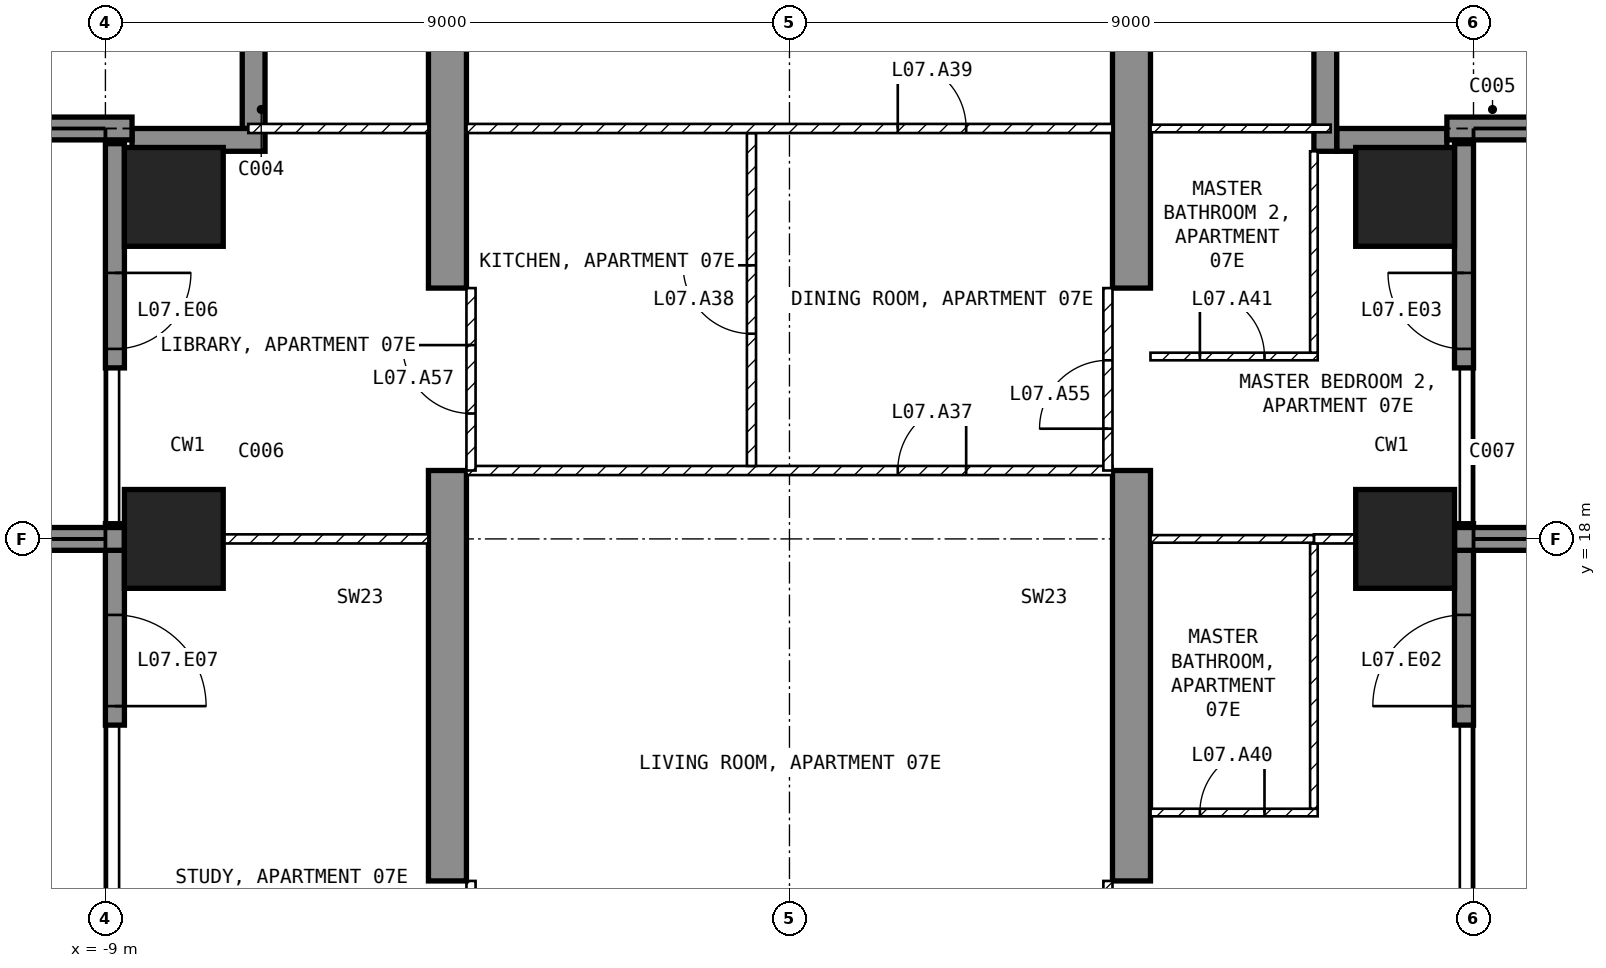
"""IFC4 building model, lengths in metres.
Left out: names, types, materials, properties, quantities, classifications, styles, units other than length and angle.
Written with IfcOpenShell. Run it as: python <this file> out.ifc"""

import sys

from ifc_helpers import new_model, si_unit, direction, frame, frame_2d, origin, origin_2d, place, context, subcontext, project, spatial, polyline, rectangle, outline, extrude, element, fill, save


model = new_model("IFC4")
c1 = context("Model", 3, precision=1e-05, world=origin(), true_north=direction((0.0, 1.0)))
c2 = subcontext(c1, "Body", "Model", "MODEL_VIEW")
j1 = project(units=[si_unit("LENGTHUNIT", "METRE"), si_unit("PLANEANGLEUNIT", "RADIAN")], contexts=[c1])
p1 = place(None, origin())
s1 = spatial("IfcSite", under=j1, at=p1, CompositionType="ELEMENT")
p2 = place(p1, origin())
s2 = spatial("IfcBuilding", under=s1, at=p2, CompositionType="ELEMENT")
p3 = place(p2, frame((0.0, 0.0, 43.5)))
s3 = spatial("IfcBuildingStorey", under=s2, at=p3, CompositionType="ELEMENT", Elevation=43.5)
for number, where, z_axis, x_axis in (
    (1, (-8.1, 18.0, -0.25), (0.0, 0.0, 1.0), (1.0, 0.0, 0.0)),
    (2, (-8.1, 22.5, -0.25), (0.0, 0.0, 1.0), (1.0, 0.0, 0.0)),
    (3, (8.1, 18.0, -0.25), (0.0, 0.0, 1.0), (1.0, 0.0, 0.0)),
    (4, (8.1, 22.5, -0.25), (0.0, 0.0, 1.0), (1.0, 0.0, 0.0)),
):
    element("IfcColumn", number, at=place(p3, frame(where, z_axis=z_axis, x_axis=x_axis)), inside=s3, PredefinedType="COLUMN", context=c2, shape_type="SweptSolid", body=[
        extrude(rectangle(XDim=1.3, YDim=1.3, at=origin_2d()), origin(), (0.0, 0.0, 1.0), 3.5),
    ])
for number, where, z_axis, x_axis in (
    (5, (-4.75, 9.0, -0.25), (1.0, 0.0, 0.0), (0.0, 1.0, 0.0)),
    (6, (4.25, 9.0, -0.25), (1.0, 0.0, 0.0), (0.0, 1.0, 0.0)),
):
    element("IfcWall", number, at=place(p3, frame(where, z_axis=z_axis, x_axis=x_axis)), inside=s3, PredefinedType="SHEAR", context=c2, shape_type="SweptSolid", body=[
        extrude(outline(polyline([(0.0, 0.0), (2.1, 0.0), (2.1, 2.65), (4.5, 2.65), (4.5, 0.0), (9.9, 0.0), (9.9, 2.65), (12.3, 2.65), (12.3, 0.0), (16.45, 0.0), (16.45, 3.5), (0.0, 3.5), (0.0, 0.0)])), origin(), (0.0, 0.0, 1.0), 0.5),
    ])
p4 = place(p3, frame((8.875, 15.55, 0.0), z_axis=(0.0, 0.0, 1.0), x_axis=(0.0, 1.0, 0.0)))
e7 = element("IfcWall", 7, at=p4, inside=s3, PredefinedType="SOLIDWALL", context=c2, shape_type="SweptSolid", body=[
    extrude(rectangle(XDim=2.65, YDim=0.25, at=frame_2d((1.325, 0.0))), origin(), (0.0, 0.0, 1.0), 3.25),
])
p5 = place(p4, frame((0.25, 0.0, 0.0)))
e8 = element("IfcOpeningElement", 8, at=p5, cuts=e7, PredefinedType="OPENING", context=c2, shape_type="SweptSolid", body=[
    extrude(rectangle(XDim=1.2, YDim=2.4, at=frame_2d((0.6, 1.2))), frame((0.0, 0.135, 0.0), z_axis=(0.0, -1.0, 0.0), x_axis=(1.0, 0.0, 0.0)), (0.0, 0.0, 1.0), 0.27),
])
p6 = place(p3, frame((8.875, 20.25, 0.0), z_axis=(0.0, 0.0, 1.0), x_axis=(0.0, 1.0, 0.0)))
e9 = element("IfcWall", 9, at=p6, inside=s3, PredefinedType="SOLIDWALL", context=c2, shape_type="SweptSolid", body=[
    extrude(rectangle(XDim=2.95, YDim=0.25, at=frame_2d((1.475, 0.0))), origin(), (0.0, 0.0, 1.0), 3.25),
])
p7 = place(p6, frame((0.25, 0.0, 0.0)))
e10 = element("IfcOpeningElement", 10, at=p7, cuts=e9, PredefinedType="OPENING", context=c2, shape_type="SweptSolid", body=[
    extrude(rectangle(XDim=1.0, YDim=2.4, at=frame_2d((0.5, 1.2))), frame((0.0, 0.135, 0.0), z_axis=(0.0, -1.0, 0.0), x_axis=(1.0, 0.0, 0.0)), (0.0, 0.0, 1.0), 0.27),
])
p8 = place(p3, frame((-8.875, 23.2, 0.0), z_axis=(0.0, 0.0, 1.0), x_axis=(0.0, -1.0, 0.0)))
e11 = element("IfcWall", 11, at=p8, inside=s3, PredefinedType="SOLIDWALL", context=c2, shape_type="SweptSolid", body=[
    extrude(rectangle(XDim=2.95, YDim=0.25, at=frame_2d((1.475, 0.0))), origin(), (0.0, 0.0, 1.0), 3.25),
])
p9 = place(p8, frame((1.7, 0.0, 0.0)))
e12 = element("IfcOpeningElement", 12, at=p9, cuts=e11, PredefinedType="OPENING", context=c2, shape_type="SweptSolid", body=[
    extrude(rectangle(XDim=1.0, YDim=2.4, at=frame_2d((0.5, 1.2))), frame((0.0, 0.135, 0.0), z_axis=(0.0, -1.0, 0.0), x_axis=(1.0, 0.0, 0.0)), (0.0, 0.0, 1.0), 0.27),
])
p10 = place(p3, frame((-8.875, 18.2, 0.0), z_axis=(0.0, 0.0, 1.0), x_axis=(0.0, -1.0, 0.0)))
e13 = element("IfcWall", 13, at=p10, inside=s3, PredefinedType="SOLIDWALL", context=c2, shape_type="SweptSolid", body=[
    extrude(rectangle(XDim=2.65, YDim=0.25, at=frame_2d((1.325, 0.0))), origin(), (0.0, 0.0, 1.0), 3.25),
])
p11 = place(p10, frame((1.2, 0.0, 0.0)))
e14 = element("IfcOpeningElement", 14, at=p11, cuts=e13, PredefinedType="OPENING", context=c2, shape_type="SweptSolid", body=[
    extrude(rectangle(XDim=1.2, YDim=2.4, at=frame_2d((0.6, 1.2))), frame((0.0, 0.135, 0.0), z_axis=(0.0, -1.0, 0.0), x_axis=(1.0, 0.0, 0.0)), (0.0, 0.0, 1.0), 0.27),
])
p12 = place(p3, frame((8.65, 23.25, 0.0), z_axis=(0.0, 0.0, 1.0), x_axis=(-1.0, 0.0, 0.0)))
e15 = element("IfcWall", 15, at=p12, inside=s3, PredefinedType="SOLIDWALL", context=c2, shape_type="SweptSolid", body=[
    extrude(rectangle(XDim=1.45, YDim=0.3, at=frame_2d((0.725, 0.0))), origin(), (0.0, 0.0, 1.0), 3.25),
])
p13 = place(p3, frame((7.05, 23.1, 0.0), z_axis=(0.0, 0.0, 1.0), x_axis=(0.0, 1.0, 0.0)))
e16 = element("IfcWall", 16, at=p13, inside=s3, PredefinedType="SOLIDWALL", context=c2, shape_type="SweptSolid", body=[
    extrude(rectangle(XDim=1.8, YDim=0.3, at=frame_2d((0.9, 0.0))), origin(), (0.0, 0.0, 1.0), 3.25),
])
p14 = place(p3, frame((-7.05, 25.2, 0.0), z_axis=(0.0, 0.0, 1.0), x_axis=(0.0, -1.0, 0.0)))
e17 = element("IfcWall", 17, at=p14, inside=s3, PredefinedType="SOLIDWALL", context=c2, shape_type="SweptSolid", body=[
    extrude(rectangle(XDim=1.8, YDim=0.3, at=frame_2d((0.9, 0.0))), origin(), (0.0, 0.0, 1.0), 3.25),
])
p15 = place(p3, frame((-6.9, 23.25, 0.0), z_axis=(0.0, 0.0, 1.0), x_axis=(-1.0, 0.0, 0.0)))
e18 = element("IfcWall", 18, at=p15, inside=s3, PredefinedType="SOLIDWALL", context=c2, shape_type="SweptSolid", body=[
    extrude(rectangle(XDim=1.75, YDim=0.3, at=frame_2d((0.875, 0.0))), origin(), (0.0, 0.0, 1.0), 3.25),
])
p16 = place(p3, frame((-8.75, 18.0, 0.0), z_axis=(0.0, 0.0, 1.0), x_axis=(-1.0, 0.0, 0.0)))
e19 = element("IfcWall", 19, at=p16, inside=s3, PredefinedType="SOLIDWALL", context=c2, shape_type="SweptSolid", body=[
    extrude(rectangle(XDim=2.95, YDim=0.3, at=frame_2d((1.475, 0.0))), origin(), (0.0, 0.0, 1.0), 3.25),
])
p17 = place(p3, frame((-8.65, 23.4, 0.0), z_axis=(0.0, 0.0, 1.0), x_axis=(-1.0, 0.0, 0.0)))
e20 = element("IfcWall", 20, at=p17, inside=s3, PredefinedType="SOLIDWALL", context=c2, shape_type="SweptSolid", body=[
    extrude(rectangle(XDim=3.05, YDim=0.3, at=frame_2d((1.525, 0.0))), origin(), (0.0, 0.0, 1.0), 3.25),
])
p18 = place(p3, frame((8.75, 18.0, 0.0), z_axis=(0.0, 0.0, 1.0), x_axis=(1.0, 0.0, 0.0)))
e21 = element("IfcWall", 21, at=p18, inside=s3, PredefinedType="SOLIDWALL", context=c2, shape_type="SweptSolid", body=[
    extrude(rectangle(XDim=2.95, YDim=0.3, at=frame_2d((1.475, 0.0))), origin(), (0.0, 0.0, 1.0), 3.25),
])
p19 = place(p3, frame((8.65, 23.4, 0.0), z_axis=(0.0, 0.0, 1.0), x_axis=(1.0, 0.0, 0.0)))
e22 = element("IfcWall", 22, at=p19, inside=s3, PredefinedType="SOLIDWALL", context=c2, shape_type="SweptSolid", body=[
    extrude(rectangle(XDim=3.05, YDim=0.3, at=frame_2d((1.525, 0.0))), origin(), (0.0, 0.0, 1.0), 3.25),
])
p20 = place(p3, frame((-4.25, 18.9, 0.0), z_axis=(0.0, 0.0, 1.0), x_axis=(1.0, 0.0, 0.0)))
e23 = element("IfcWall", 23, at=p20, inside=s3, PredefinedType="PARTITIONING", context=c2, shape_type="SweptSolid", body=[
    extrude(rectangle(XDim=8.5, YDim=0.12, at=frame_2d((4.25, 0.0))), origin(), (0.0, 0.0, 1.0), 3.25),
])
p21 = place(p20, frame((5.675, 0.0, 0.0)))
e24 = element("IfcOpeningElement", 24, at=p21, cuts=e23, PredefinedType="OPENING", context=c2, shape_type="SweptSolid", body=[
    extrude(rectangle(XDim=0.9, YDim=2.1, at=frame_2d((0.45, 1.05))), frame((0.0, 0.07, 0.0), z_axis=(0.0, -1.0, 0.0), x_axis=(1.0, 0.0, 0.0)), (0.0, 0.0, 1.0), 0.14),
])
p22 = place(p3, frame((-0.5, 18.96, 0.0), z_axis=(0.0, 0.0, 1.0), x_axis=(0.0, 1.0, 0.0)))
e25 = element("IfcWall", 25, at=p22, inside=s3, PredefinedType="PARTITIONING", context=c2, shape_type="SweptSolid", body=[
    extrude(rectangle(XDim=4.38, YDim=0.12, at=frame_2d((2.19, 0.0))), origin(), (0.0, 0.0, 1.0), 3.25),
])
p23 = place(p22, frame((1.74, 0.0, 0.0)))
e26 = element("IfcOpeningElement", 26, at=p23, cuts=e25, PredefinedType="OPENING", context=c2, shape_type="SweptSolid", body=[
    extrude(rectangle(XDim=0.9, YDim=2.1, at=frame_2d((0.45, 1.05))), frame((0.0, 0.07, 0.0), z_axis=(0.0, -1.0, 0.0), x_axis=(1.0, 0.0, 0.0)), (0.0, 0.0, 1.0), 0.14),
])
p24 = place(p3, frame((-4.25, 23.4, 0.0), z_axis=(0.0, 0.0, 1.0), x_axis=(1.0, 0.0, 0.0)))
e27 = element("IfcWall", 27, at=p24, inside=s3, PredefinedType="PARTITIONING", context=c2, shape_type="SweptSolid", body=[
    extrude(rectangle(XDim=8.5, YDim=0.12, at=frame_2d((4.25, 0.0))), origin(), (0.0, 0.0, 1.0), 3.25),
])
p25 = place(p24, frame((5.675, 0.0, 0.0)))
e28 = element("IfcOpeningElement", 28, at=p25, cuts=e27, PredefinedType="OPENING", context=c2, shape_type="SweptSolid", body=[
    extrude(rectangle(XDim=0.9, YDim=2.1, at=frame_2d((0.45, 1.05))), frame((0.0, 0.07, 0.0), z_axis=(0.0, -1.0, 0.0), x_axis=(1.0, 0.0, 0.0)), (0.0, 0.0, 1.0), 0.14),
])
p26 = place(p3, frame((4.75, 14.4, 0.0), z_axis=(0.0, 0.0, 1.0), x_axis=(1.0, 0.0, 0.0)))
e29 = element("IfcWall", 29, at=p26, inside=s3, PredefinedType="PARTITIONING", context=c2, shape_type="SweptSolid", body=[
    extrude(rectangle(XDim=2.2, YDim=0.1, at=frame_2d((1.1, 0.0))), origin(), (0.0, 0.0, 1.0), 3.25),
])
p27 = place(p26, frame((0.65, 0.0, 0.0)))
e30 = element("IfcOpeningElement", 30, at=p27, cuts=e29, PredefinedType="OPENING", context=c2, shape_type="SweptSolid", body=[
    extrude(rectangle(XDim=0.85, YDim=2.1, at=frame_2d((0.425, 1.05))), frame((0.0, 0.06, 0.0), z_axis=(0.0, -1.0, 0.0), x_axis=(1.0, 0.0, 0.0)), (0.0, 0.0, 1.0), 0.12),
])
p28 = place(p3, frame((6.9, 14.45, 0.0), z_axis=(0.0, 0.0, 1.0), x_axis=(0.0, 1.0, 0.0)))
e31 = element("IfcWall", 31, at=p28, inside=s3, PredefinedType="PARTITIONING", context=c2, shape_type="SweptSolid", body=[
    extrude(rectangle(XDim=3.49, YDim=0.1, at=frame_2d((1.745, 0.0))), origin(), (0.0, 0.0, 1.0), 3.25),
])
p29 = place(p3, frame((6.9, 18.0, 0.0), z_axis=(0.0, 0.0, 1.0), x_axis=(1.0, 0.0, 0.0)))
e32 = element("IfcWall", 32, at=p29, inside=s3, PredefinedType="PARTITIONING", context=c2, shape_type="SweptSolid", body=[
    extrude(rectangle(XDim=0.55, YDim=0.12, at=frame_2d((0.275, 0.0))), origin(), (0.0, 0.0, 1.0), 2.346),
])
p30 = place(p3, frame((4.75, 18.0, 0.0), z_axis=(0.0, 0.0, 1.0), x_axis=(1.0, 0.0, 0.0)))
e33 = element("IfcWall", 33, at=p30, inside=s3, PredefinedType="PARTITIONING", context=c2, shape_type="SweptSolid", body=[
    extrude(rectangle(XDim=2.15, YDim=0.1, at=frame_2d((1.075, 0.0))), origin(), (0.0, 0.0, 1.0), 2.346),
])
p31 = place(p3, frame((4.75, 20.4, 0.0), z_axis=(0.0, 0.0, 1.0), x_axis=(1.0, 0.0, 0.0)))
e34 = element("IfcWall", 34, at=p31, inside=s3, PredefinedType="PARTITIONING", context=c2, shape_type="SweptSolid", body=[
    extrude(rectangle(XDim=2.2, YDim=0.1, at=frame_2d((1.1, 0.0))), origin(), (0.0, 0.0, 1.0), 3.25),
])
p32 = place(p31, frame((0.65, 0.0, 0.0)))
e35 = element("IfcOpeningElement", 35, at=p32, cuts=e34, PredefinedType="OPENING", context=c2, shape_type="SweptSolid", body=[
    extrude(rectangle(XDim=0.85, YDim=2.1, at=frame_2d((0.425, 1.05))), frame((0.0, 0.06, 0.0), z_axis=(0.0, -1.0, 0.0), x_axis=(1.0, 0.0, 0.0)), (0.0, 0.0, 1.0), 0.12),
])
p33 = place(p3, frame((6.9, 20.45, 0.0), z_axis=(0.0, 0.0, 1.0), x_axis=(0.0, 1.0, 0.0)))
e36 = element("IfcWall", 36, at=p33, inside=s3, PredefinedType="PARTITIONING", context=c2, shape_type="SweptSolid", body=[
    extrude(rectangle(XDim=2.65, YDim=0.1, at=frame_2d((1.325, 0.0))), origin(), (0.0, 0.0, 1.0), 3.25),
])
p34 = place(p3, frame((4.75, 23.4, 0.0), z_axis=(0.0, 0.0, 1.0), x_axis=(1.0, 0.0, 0.0)))
e37 = element("IfcWall", 37, at=p34, inside=s3, PredefinedType="PARTITIONING", context=c2, shape_type="SweptSolid", body=[
    extrude(rectangle(XDim=2.37, YDim=0.1, at=frame_2d((1.185, 0.0))), origin(), (0.0, 0.0, 1.0), 3.25),
])
p35 = place(p3, frame((-7.45, 18.0, 0.0), z_axis=(0.0, 0.0, 1.0), x_axis=(1.0, 0.0, 0.0)))
e38 = element("IfcWall", 38, at=p35, inside=s3, PredefinedType="PARTITIONING", context=c2, shape_type="SweptSolid", body=[
    extrude(rectangle(XDim=2.7, YDim=0.12, at=frame_2d((1.35, 0.0))), origin(), (0.0, 0.0, 1.0), 2.346),
])
p36 = place(p3, frame((-7.12, 23.4, 0.0), z_axis=(0.0, 0.0, 1.0), x_axis=(1.0, 0.0, 0.0)))
e39 = element("IfcWall", 39, at=p36, inside=s3, PredefinedType="PARTITIONING", context=c2, shape_type="SweptSolid", body=[
    extrude(rectangle(XDim=2.37, YDim=0.12, at=frame_2d((1.185, 0.0))), origin(), (0.0, 0.0, 1.0), 3.25),
])
p37 = place(p3, frame((4.19, 11.1, 0.0), z_axis=(0.0, 0.0, 1.0), x_axis=(0.0, 1.0, 0.0)))
e40 = element("IfcWall", 40, at=p37, inside=s3, PredefinedType="PARTITIONING", context=c2, shape_type="SweptSolid", body=[
    extrude(rectangle(XDim=2.4, YDim=0.12, at=frame_2d((1.2, 0.0))), origin(), (0.0, 0.0, 1.0), 2.4),
])
p38 = place(p37, frame((0.75, 0.0, 0.0)))
e41 = element("IfcOpeningElement", 41, at=p38, cuts=e40, PredefinedType="OPENING", context=c2, shape_type="SweptSolid", body=[
    extrude(rectangle(XDim=0.9, YDim=2.1, at=frame_2d((0.45, 1.05))), frame((0.0, 0.07, 0.0), z_axis=(0.0, -1.0, 0.0), x_axis=(1.0, 0.0, 0.0)), (0.0, 0.0, 1.0), 0.14),
])
p39 = place(p3, frame((4.19, 18.9, 0.0), z_axis=(0.0, 0.0, 1.0), x_axis=(0.0, 1.0, 0.0)))
e42 = element("IfcWall", 42, at=p39, inside=s3, PredefinedType="PARTITIONING", context=c2, shape_type="SweptSolid", body=[
    extrude(rectangle(XDim=2.4, YDim=0.12, at=frame_2d((1.2, 0.0))), origin(), (0.0, 0.0, 1.0), 2.4),
])
p40 = place(p39, frame((0.55, 0.0, 0.0)))
e43 = element("IfcOpeningElement", 43, at=p40, cuts=e42, PredefinedType="OPENING", context=c2, shape_type="SweptSolid", body=[
    extrude(rectangle(XDim=0.9, YDim=2.1, at=frame_2d((0.45, 1.05))), frame((0.0, 0.07, 0.0), z_axis=(0.0, -1.0, 0.0), x_axis=(1.0, 0.0, 0.0)), (0.0, 0.0, 1.0), 0.14),
])
p41 = place(p3, frame((-4.19, 11.1, 0.0), z_axis=(0.0, 0.0, 1.0), x_axis=(0.0, 1.0, 0.0)))
e44 = element("IfcWall", 44, at=p41, inside=s3, PredefinedType="PARTITIONING", context=c2, shape_type="SweptSolid", body=[
    extrude(rectangle(XDim=2.4, YDim=0.12, at=frame_2d((1.2, 0.0))), origin(), (0.0, 0.0, 1.0), 2.4),
])
p42 = place(p41, frame((0.75, 0.0, 0.0)))
e45 = element("IfcOpeningElement", 45, at=p42, cuts=e44, PredefinedType="OPENING", context=c2, shape_type="SweptSolid", body=[
    extrude(rectangle(XDim=0.9, YDim=2.1, at=frame_2d((0.45, 1.05))), frame((0.0, 0.07, 0.0), z_axis=(0.0, -1.0, 0.0), x_axis=(1.0, 0.0, 0.0)), (0.0, 0.0, 1.0), 0.14),
])
p43 = place(p3, frame((-4.19, 18.9, 0.0), z_axis=(0.0, 0.0, 1.0), x_axis=(0.0, 1.0, 0.0)))
e46 = element("IfcWall", 46, at=p43, inside=s3, PredefinedType="PARTITIONING", context=c2, shape_type="SweptSolid", body=[
    extrude(rectangle(XDim=2.4, YDim=0.12, at=frame_2d((1.2, 0.0))), origin(), (0.0, 0.0, 1.0), 2.4),
])
p44 = place(p43, frame((0.75, 0.0, 0.0)))
e47 = element("IfcOpeningElement", 47, at=p44, cuts=e46, PredefinedType="OPENING", context=c2, shape_type="SweptSolid", body=[
    extrude(rectangle(XDim=0.9, YDim=2.1, at=frame_2d((0.45, 1.05))), frame((0.0, 0.07, 0.0), z_axis=(0.0, -1.0, 0.0), x_axis=(1.0, 0.0, 0.0)), (0.0, 0.0, 1.0), 0.14),
])
p45 = place(p5, origin())
e48 = element("IfcDoor", 48, at=p45, inside=s3, OperationType="SINGLE_SWING_LEFT", PredefinedType="DOOR", context=c2, shape_type="SweptSolid", body=[
    extrude(rectangle(XDim=1.2, YDim=2.4, at=frame_2d((0.6, 1.2))), frame((0.0, 0.025, 0.0), z_axis=(0.0, -1.0, 0.0), x_axis=(1.0, 0.0, 0.0)), (0.0, 0.0, 1.0), 0.05),
])
fill(e8, e48)
p46 = place(p7, origin())
e49 = element("IfcDoor", 49, at=p46, inside=s3, OperationType="SINGLE_SWING_RIGHT", PredefinedType="DOOR", context=c2, shape_type="SweptSolid", body=[
    extrude(rectangle(XDim=1.0, YDim=2.4, at=frame_2d((0.5, 1.2))), frame((0.0, 0.025, 0.0), z_axis=(0.0, -1.0, 0.0), x_axis=(1.0, 0.0, 0.0)), (0.0, 0.0, 1.0), 0.05),
])
fill(e10, e49)
p47 = place(p9, origin())
e50 = element("IfcDoor", 50, at=p47, inside=s3, OperationType="SINGLE_SWING_LEFT", PredefinedType="DOOR", context=c2, shape_type="SweptSolid", body=[
    extrude(rectangle(XDim=1.0, YDim=2.4, at=frame_2d((0.5, 1.2))), frame((0.0, 0.025, 0.0), z_axis=(0.0, -1.0, 0.0), x_axis=(1.0, 0.0, 0.0)), (0.0, 0.0, 1.0), 0.05),
])
fill(e12, e50)
p48 = place(p11, origin())
e51 = element("IfcDoor", 51, at=p48, inside=s3, OperationType="SINGLE_SWING_RIGHT", PredefinedType="DOOR", context=c2, shape_type="SweptSolid", body=[
    extrude(rectangle(XDim=1.2, YDim=2.4, at=frame_2d((0.6, 1.2))), frame((0.0, 0.025, 0.0), z_axis=(0.0, -1.0, 0.0), x_axis=(1.0, 0.0, 0.0)), (0.0, 0.0, 1.0), 0.05),
])
fill(e14, e51)
p49 = place(p21, origin())
e52 = element("IfcDoor", 52, at=p49, inside=s3, OperationType="SINGLE_SWING_RIGHT", PredefinedType="DOOR", context=c2, shape_type="SweptSolid", body=[
    extrude(rectangle(XDim=0.9, YDim=2.1, at=frame_2d((0.45, 1.05))), frame((0.0, 0.025, 0.0), z_axis=(0.0, -1.0, 0.0), x_axis=(1.0, 0.0, 0.0)), (0.0, 0.0, 1.0), 0.05),
])
fill(e24, e52)
p50 = place(p23, origin())
e53 = element("IfcDoor", 53, at=p50, inside=s3, OperationType="SINGLE_SWING_RIGHT", PredefinedType="DOOR", context=c2, shape_type="SweptSolid", body=[
    extrude(rectangle(XDim=0.9, YDim=2.1, at=frame_2d((0.45, 1.05))), frame((0.0, 0.025, 0.0), z_axis=(0.0, -1.0, 0.0), x_axis=(1.0, 0.0, 0.0)), (0.0, 0.0, 1.0), 0.05),
])
fill(e26, e53)
p51 = place(p25, origin())
e54 = element("IfcDoor", 54, at=p51, inside=s3, OperationType="SINGLE_SWING_LEFT", PredefinedType="DOOR", context=c2, shape_type="SweptSolid", body=[
    extrude(rectangle(XDim=0.9, YDim=2.1, at=frame_2d((0.45, 1.05))), frame((0.0, 0.025, 0.0), z_axis=(0.0, -1.0, 0.0), x_axis=(1.0, 0.0, 0.0)), (0.0, 0.0, 1.0), 0.05),
])
fill(e28, e54)
p52 = place(p27, origin())
e55 = element("IfcDoor", 55, at=p52, inside=s3, OperationType="SINGLE_SWING_RIGHT", PredefinedType="DOOR", context=c2, shape_type="SweptSolid", body=[
    extrude(rectangle(XDim=0.85, YDim=2.1, at=frame_2d((0.425, 1.05))), frame((0.0, 0.025, 0.0), z_axis=(0.0, -1.0, 0.0), x_axis=(1.0, 0.0, 0.0)), (0.0, 0.0, 1.0), 0.05),
])
fill(e30, e55)
p53 = place(p32, origin())
e56 = element("IfcDoor", 56, at=p53, inside=s3, OperationType="SINGLE_SWING_LEFT", PredefinedType="DOOR", context=c2, shape_type="SweptSolid", body=[
    extrude(rectangle(XDim=0.85, YDim=2.1, at=frame_2d((0.425, 1.05))), frame((0.0, 0.025, 0.0), z_axis=(0.0, -1.0, 0.0), x_axis=(1.0, 0.0, 0.0)), (0.0, 0.0, 1.0), 0.05),
])
fill(e35, e56)
p54 = place(p40, origin())
e57 = element("IfcDoor", 57, at=p54, inside=s3, OperationType="SINGLE_SWING_LEFT", PredefinedType="DOOR", context=c2, shape_type="SweptSolid", body=[
    extrude(rectangle(XDim=0.9, YDim=2.1, at=frame_2d((0.45, 1.05))), frame((0.0, 0.025, 0.0), z_axis=(0.0, -1.0, 0.0), x_axis=(1.0, 0.0, 0.0)), (0.0, 0.0, 1.0), 0.05),
])
fill(e43, e57)
p55 = place(p44, origin())
e58 = element("IfcDoor", 58, at=p55, inside=s3, OperationType="SINGLE_SWING_RIGHT", PredefinedType="DOOR", context=c2, shape_type="SweptSolid", body=[
    extrude(rectangle(XDim=0.9, YDim=2.1, at=frame_2d((0.45, 1.05))), frame((0.0, 0.025, 0.0), z_axis=(0.0, -1.0, 0.0), x_axis=(1.0, 0.0, 0.0)), (0.0, 0.0, 1.0), 0.05),
])
fill(e47, e58)
save(model, sys.argv[1])
